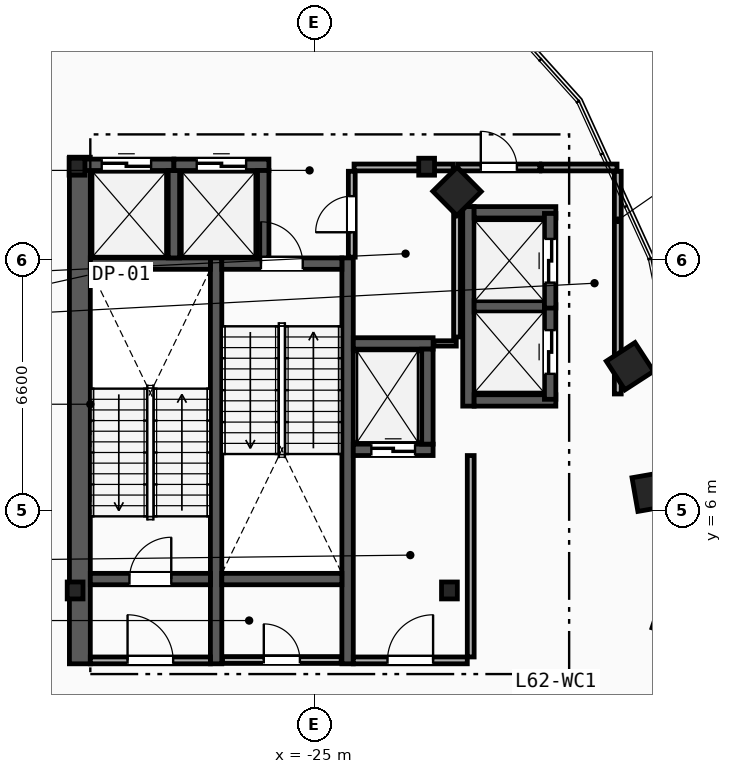
"""IFC4 building model, lengths in metres.
Left out: names, types, materials, properties, quantities, classifications, styles, units other than length and angle.
Written with IfcOpenShell. Run it as: python <this file> out.ifc"""

import sys

from ifc_helpers import new_model, si_unit, direction, frame, frame_2d, origin, origin_2d, place, context, subcontext, project, spatial, rectangle, i_section, extrude, element, fill, save


model = new_model("IFC4")
c1 = context("Model", 3, precision=1e-05, world=origin(), true_north=direction((0.0, 1.0)))
c2 = subcontext(c1, "Body", "Model", "MODEL_VIEW")
j1 = project(units=[si_unit("LENGTHUNIT", "METRE"), si_unit("PLANEANGLEUNIT", "RADIAN")], contexts=[c1])
p1 = place(None, origin())
s1 = spatial("IfcSite", under=j1, at=p1, CompositionType="ELEMENT")
p2 = place(p1, origin())
s2 = spatial("IfcBuilding", under=s1, at=p2, CompositionType="ELEMENT")
p3 = place(p2, frame((0.0, 0.0, 235.0)))
s3 = spatial("IfcBuildingStorey", under=s2, at=p3, CompositionType="ELEMENT", Elevation=235.0)
for number, where, z_axis, x_axis in (
    (1, (-31.3, 3.9, 0.0), (0.0, 0.0, 1.0), (1.0, 0.0, 0.0)),
    (2, (-21.45, 3.9, 0.0), (0.0, 0.0, 1.0), (1.0, 0.0, 0.0)),
    (3, (-22.05, 15.05, 0.0), (0.0, 0.0, 1.0), (1.0, 0.0, 0.0)),
    (4, (-31.25, 15.05, 0.0), (0.0, 0.0, 1.0), (1.0, 0.0, 0.0)),
):
    element("IfcColumn", number, at=place(p3, frame(where, z_axis=z_axis, x_axis=x_axis)), inside=s3, PredefinedType="COLUMN", context=c2, shape_type="SweptSolid", body=[
        extrude(i_section(OverallWidth=0.416, OverallDepth=0.446, WebThickness=0.039, FlangeThickness=0.063, FilletRadius=0.018, at=origin_2d()), origin(), (0.0, 0.0, 1.0), 4.6),
    ])
for number, where, z_axis, x_axis in (
    (5, (-15.55, 3.2, 0.0), (0.0, 0.0, 1.0), (0.315, 0.949, 0.0)),
    (6, (-16.125, 6.5, 0.0), (0.0, 0.0, 1.0), (-0.172, 0.985, 0.0)),
    (7, (-16.7, 9.8, 0.0), (0.0, 0.0, 1.0), (-0.544, 0.839, 0.0)),
    (8, (-21.25, 14.4, 0.0), (0.0, 0.0, 1.0), (-0.703, 0.711, 0.0)),
):
    element("IfcColumn", number, at=place(p3, frame(where, z_axis=z_axis, x_axis=x_axis)), inside=s3, PredefinedType="COLUMN", context=c2, shape_type="SweptSolid", body=[
        extrude(rectangle(XDim=0.9, YDim=0.9, at=origin_2d()), origin(), (0.0, 0.0, 1.0), 4.6),
    ])
p4 = place(p3, frame((-31.175, 1.97, 0.0), z_axis=(0.0, 0.0, 1.0), x_axis=(0.0, 1.0, 0.0)))
e9 = element("IfcWall", 9, at=p4, inside=s3, PredefinedType="SHEAR", context=c2, shape_type="SweptSolid", body=[
    extrude(rectangle(XDim=13.33, YDim=0.55, at=frame_2d((6.665, 0.0))), origin(), (0.0, 0.0, 1.0), 4.34),
])
for number, where, z_axis, x_axis in (
    (10, (-27.59, 1.97, 0.0), (0.0, 0.0, 1.0), (0.0, 1.0, 0.0)),
    (11, (-24.13, 1.97, 0.0), (0.0, 0.0, 1.0), (0.0, 1.0, 0.0)),
):
    element("IfcWall", number, at=place(p3, frame(where, z_axis=z_axis, x_axis=x_axis)), inside=s3, PredefinedType="SHEAR", context=c2, shape_type="SweptSolid", body=[
        extrude(rectangle(XDim=10.68, YDim=0.3, at=frame_2d((5.34, 0.0))), origin(), (0.0, 0.0, 1.0), 4.34),
    ])
p5 = place(p3, frame((-30.9, 4.2, 0.0), z_axis=(0.0, 0.0, 1.0), x_axis=(1.0, 0.0, 0.0)))
e12 = element("IfcWall", 12, at=p5, inside=s3, PredefinedType="SHEAR", context=c2, shape_type="SweptSolid", body=[
    extrude(rectangle(XDim=3.16, YDim=0.3, at=frame_2d((1.58, 0.0))), origin(), (0.0, 0.0, 1.0), 4.34),
])
p6 = place(p5, frame((1.03, 0.0, 0.0)))
e13 = element("IfcOpeningElement", 13, at=p6, cuts=e12, PredefinedType="OPENING", context=c2, shape_type="SweptSolid", body=[
    extrude(rectangle(XDim=1.1, YDim=2.15, at=frame_2d((0.55, 1.075))), frame((0.0, 0.16, 0.0), z_axis=(0.0, -1.0, 0.0), x_axis=(1.0, 0.0, 0.0)), (0.0, 0.0, 1.0), 0.32),
])
p7 = place(p3, frame((-30.9, 12.5, 0.0), z_axis=(0.0, 0.0, 1.0), x_axis=(1.0, 0.0, 0.0)))
e14 = element("IfcWall", 14, at=p7, inside=s3, PredefinedType="SHEAR", context=c2, shape_type="SweptSolid", body=[
    extrude(rectangle(XDim=3.16, YDim=0.3, at=frame_2d((1.58, 0.0))), origin(), (0.0, 0.0, 1.0), 4.34),
])
p8 = place(p3, frame((-27.44, 12.5, 0.0), z_axis=(0.0, 0.0, 1.0), x_axis=(1.0, 0.0, 0.0)))
e15 = element("IfcWall", 15, at=p8, inside=s3, PredefinedType="SHEAR", context=c2, shape_type="SweptSolid", body=[
    extrude(rectangle(XDim=3.16, YDim=0.3, at=frame_2d((1.58, 0.0))), origin(), (0.0, 0.0, 1.0), 4.34),
])
p9 = place(p8, frame((1.03, 0.0, 0.0)))
e16 = element("IfcOpeningElement", 16, at=p9, cuts=e15, PredefinedType="OPENING", context=c2, shape_type="SweptSolid", body=[
    extrude(rectangle(XDim=1.1, YDim=2.15, at=frame_2d((0.55, 1.075))), frame((0.0, 0.16, 0.0), z_axis=(0.0, -1.0, 0.0), x_axis=(1.0, 0.0, 0.0)), (0.0, 0.0, 1.0), 0.32),
])
p10 = place(p3, frame((-27.44, 4.2, 0.0), z_axis=(0.0, 0.0, 1.0), x_axis=(1.0, 0.0, 0.0)))
e17 = element("IfcWall", 17, at=p10, inside=s3, PredefinedType="SHEAR", context=c2, shape_type="SweptSolid", body=[
    extrude(rectangle(XDim=3.16, YDim=0.3, at=frame_2d((1.58, 0.0))), origin(), (0.0, 0.0, 1.0), 4.34),
])
p11 = place(p3, frame((-20.89, 2.15, 0.0), z_axis=(0.0, 0.0, 1.0), x_axis=(0.0, 1.0, 0.0)))
e18 = element("IfcWall", 18, at=p11, inside=s3, PredefinedType="PARTITIONING", context=c2, shape_type="SweptSolid", body=[
    extrude(rectangle(XDim=5.3, YDim=0.18, at=frame_2d((2.65, 0.0))), origin(), (0.0, 0.0, 1.0), 4.34),
])
p12 = place(p3, frame((-23.98, 2.06, 0.0), z_axis=(0.0, 0.0, 1.0), x_axis=(1.0, 0.0, 0.0)))
e19 = element("IfcWall", 19, at=p12, inside=s3, PredefinedType="PARTITIONING", context=c2, shape_type="SweptSolid", body=[
    extrude(rectangle(XDim=3.0, YDim=0.18, at=frame_2d((1.5, 0.0))), origin(), (0.0, 0.0, 1.0), 4.34),
])
p13 = place(p12, frame((0.9, 0.0, 0.0)))
e20 = element("IfcOpeningElement", 20, at=p13, cuts=e19, PredefinedType="OPENING", context=c2, shape_type="SweptSolid", body=[
    extrude(rectangle(XDim=1.2, YDim=2.15, at=frame_2d((0.6, 1.075))), frame((0.0, 0.1, 0.0), z_axis=(0.0, -1.0, 0.0), x_axis=(1.0, 0.0, 0.0)), (0.0, 0.0, 1.0), 0.2),
])
p14 = place(p3, frame((-30.9, 2.06, 0.0), z_axis=(0.0, 0.0, 1.0), x_axis=(1.0, 0.0, 0.0)))
e21 = element("IfcWall", 21, at=p14, inside=s3, PredefinedType="PARTITIONING", context=c2, shape_type="SweptSolid", body=[
    extrude(rectangle(XDim=3.16, YDim=0.18, at=frame_2d((1.58, 0.0))), origin(), (0.0, 0.0, 1.0), 4.34),
])
p15 = place(p14, frame((0.98, 0.0, 0.0)))
e22 = element("IfcOpeningElement", 22, at=p15, cuts=e21, PredefinedType="OPENING", context=c2, shape_type="SweptSolid", body=[
    extrude(rectangle(XDim=1.2, YDim=2.15, at=frame_2d((0.6, 1.075))), frame((0.0, 0.1, 0.0), z_axis=(0.0, -1.0, 0.0), x_axis=(1.0, 0.0, 0.0)), (0.0, 0.0, 1.0), 0.2),
])
p16 = place(p3, frame((-23.98, 7.6, 0.0), z_axis=(0.0, 0.0, 1.0), x_axis=(1.0, 0.0, 0.0)))
e23 = element("IfcWall", 23, at=p16, inside=s3, PredefinedType="SHEAR", context=c2, shape_type="SweptSolid", body=[
    extrude(rectangle(XDim=2.1, YDim=0.3, at=frame_2d((1.05, 0.0))), origin(), (0.0, 0.0, 1.0), 4.34),
])
p17 = place(p16, frame((0.475, 0.0, 0.0)))
e24 = element("IfcOpeningElement", 24, at=p17, cuts=e23, PredefinedType="OPENING", context=c2, shape_type="SweptSolid", body=[
    extrude(rectangle(XDim=1.15, YDim=2.2, at=frame_2d((0.575, 1.1))), frame((0.0, 0.16, 0.0), z_axis=(0.0, -1.0, 0.0), x_axis=(1.0, 0.0, 0.0)), (0.0, 0.0, 1.0), 0.32),
])
p18 = place(p3, frame((-23.98, 10.4, 0.0), z_axis=(0.0, 0.0, 1.0), x_axis=(1.0, 0.0, 0.0)))
e25 = element("IfcWall", 25, at=p18, inside=s3, PredefinedType="SHEAR", context=c2, shape_type="SweptSolid", body=[
    extrude(rectangle(XDim=2.1, YDim=0.3, at=frame_2d((1.05, 0.0))), origin(), (0.0, 0.0, 1.0), 4.34),
])
p19 = place(p3, frame((-22.03, 7.75, 0.0), z_axis=(0.0, 0.0, 1.0), x_axis=(0.0, 1.0, 0.0)))
e26 = element("IfcWall", 26, at=p19, inside=s3, PredefinedType="SHEAR", context=c2, shape_type="SweptSolid", body=[
    extrude(rectangle(XDim=2.5, YDim=0.3, at=frame_2d((1.25, 0.0))), origin(), (0.0, 0.0, 1.0), 4.34),
])
p20 = place(p3, frame((-31.2, 15.1, 0.0), z_axis=(0.0, 0.0, 1.0), x_axis=(1.0, 0.0, 0.0)))
e27 = element("IfcWall", 27, at=p20, inside=s3, PredefinedType="SHEAR", context=c2, shape_type="SweptSolid", body=[
    extrude(rectangle(XDim=2.5, YDim=0.3, at=frame_2d((1.25, 0.0))), origin(), (0.0, 0.0, 1.0), 4.34),
])
p21 = place(p20, frame((0.6, 0.0, 0.0)))
e28 = element("IfcOpeningElement", 28, at=p21, cuts=e27, PredefinedType="OPENING", context=c2, shape_type="SweptSolid", body=[
    extrude(rectangle(XDim=1.3, YDim=2.2, at=frame_2d((0.65, 1.1))), frame((0.0, 0.16, 0.0), z_axis=(0.0, -1.0, 0.0), x_axis=(1.0, 0.0, 0.0)), (0.0, 0.0, 1.0), 0.32),
])
p22 = place(p3, frame((-28.7, 12.65, 0.0), z_axis=(0.0, 0.0, 1.0), x_axis=(0.0, 1.0, 0.0)))
e29 = element("IfcWall", 29, at=p22, inside=s3, PredefinedType="SHEAR", context=c2, shape_type="SweptSolid", body=[
    extrude(rectangle(XDim=2.3, YDim=0.3, at=frame_2d((1.15, 0.0))), origin(), (0.0, 0.0, 1.0), 4.34),
])
p23 = place(p3, frame((-28.7, 15.1, 0.0), z_axis=(0.0, 0.0, 1.0), x_axis=(1.0, 0.0, 0.0)))
e30 = element("IfcWall", 30, at=p23, inside=s3, PredefinedType="SHEAR", context=c2, shape_type="SweptSolid", body=[
    extrude(rectangle(XDim=2.5, YDim=0.3, at=frame_2d((1.25, 0.0))), origin(), (0.0, 0.0, 1.0), 4.34),
])
p24 = place(p23, frame((0.6, 0.0, 0.0)))
e31 = element("IfcOpeningElement", 31, at=p24, cuts=e30, PredefinedType="OPENING", context=c2, shape_type="SweptSolid", body=[
    extrude(rectangle(XDim=1.3, YDim=2.2, at=frame_2d((0.65, 1.1))), frame((0.0, 0.16, 0.0), z_axis=(0.0, -1.0, 0.0), x_axis=(1.0, 0.0, 0.0)), (0.0, 0.0, 1.0), 0.32),
])
p25 = place(p3, frame((-26.35, 12.65, 0.0), z_axis=(0.0, 0.0, 1.0), x_axis=(0.0, 1.0, 0.0)))
e32 = element("IfcWall", 32, at=p25, inside=s3, PredefinedType="SHEAR", context=c2, shape_type="SweptSolid", body=[
    extrude(rectangle(XDim=2.3, YDim=0.3, at=frame_2d((1.15, 0.0))), origin(), (0.0, 0.0, 1.0), 4.34),
])
p26 = place(p3, frame((-20.95, 8.75, 0.0), z_axis=(0.0, 0.0, 1.0), x_axis=(0.0, 1.0, 0.0)))
e33 = element("IfcWall", 33, at=p26, inside=s3, PredefinedType="SHEAR", context=c2, shape_type="SweptSolid", body=[
    extrude(rectangle(XDim=5.25, YDim=0.3, at=frame_2d((2.625, 0.0))), origin(), (0.0, 0.0, 1.0), 4.34),
])
for number, where, z_axis, x_axis in (
    (34, (-20.8, 8.9, 0.0), (0.0, 0.0, 1.0), (1.0, 0.0, 0.0)),
    (35, (-20.8, 13.85, 0.0), (0.0, 0.0, 1.0), (1.0, 0.0, 0.0)),
):
    element("IfcWall", number, at=place(p3, frame(where, z_axis=z_axis, x_axis=x_axis)), inside=s3, PredefinedType="SHEAR", context=c2, shape_type="SweptSolid", body=[
        extrude(rectangle(XDim=2.15, YDim=0.3, at=frame_2d((1.075, 0.0))), origin(), (0.0, 0.0, 1.0), 4.34),
    ])
p27 = place(p3, frame((-20.8, 11.375, 0.0), z_axis=(0.0, 0.0, 1.0), x_axis=(1.0, 0.0, 0.0)))
e36 = element("IfcWall", 36, at=p27, inside=s3, PredefinedType="SHEAR", context=c2, shape_type="SweptSolid", body=[
    extrude(rectangle(XDim=1.85, YDim=0.3, at=frame_2d((0.925, 0.0))), origin(), (0.0, 0.0, 1.0), 4.34),
])
p28 = place(p3, frame((-18.8, 8.93, 0.0), z_axis=(0.0, 0.0, 1.0), x_axis=(0.0, 1.0, 0.0)))
e37 = element("IfcWall", 37, at=p28, inside=s3, PredefinedType="SHEAR", context=c2, shape_type="SweptSolid", body=[
    extrude(rectangle(XDim=2.49, YDim=0.3, at=frame_2d((1.245, 0.0))), origin(), (0.0, 0.0, 1.0), 4.34),
])
p29 = place(p28, frame((0.67, 0.0, 0.0)))
e38 = element("IfcOpeningElement", 38, at=p29, cuts=e37, PredefinedType="OPENING", context=c2, shape_type="SweptSolid", body=[
    extrude(rectangle(XDim=1.15, YDim=2.2, at=frame_2d((0.575, 1.1))), frame((0.0, 0.16, 0.0), z_axis=(0.0, -1.0, 0.0), x_axis=(1.0, 0.0, 0.0)), (0.0, 0.0, 1.0), 0.32),
])
p30 = place(p3, frame((-18.8, 11.33, 0.0), z_axis=(0.0, 0.0, 1.0), x_axis=(0.0, 1.0, 0.0)))
e39 = element("IfcWall", 39, at=p30, inside=s3, PredefinedType="SHEAR", context=c2, shape_type="SweptSolid", body=[
    extrude(rectangle(XDim=2.49, YDim=0.3, at=frame_2d((1.245, 0.0))), origin(), (0.0, 0.0, 1.0), 4.34),
])
p31 = place(p30, frame((0.67, 0.0, 0.0)))
e40 = element("IfcOpeningElement", 40, at=p31, cuts=e39, PredefinedType="OPENING", context=c2, shape_type="SweptSolid", body=[
    extrude(rectangle(XDim=1.15, YDim=2.2, at=frame_2d((0.575, 1.1))), frame((0.0, 0.16, 0.0), z_axis=(0.0, -1.0, 0.0), x_axis=(1.0, 0.0, 0.0)), (0.0, 0.0, 1.0), 0.32),
])
p32 = place(p3, frame((-17.02, 9.07, 0.0), z_axis=(0.0, 0.0, 1.0), x_axis=(0.0, 1.0, 0.0)))
e41 = element("IfcWall", 41, at=p32, inside=s3, PredefinedType="PARTITIONING", context=c2, shape_type="SweptSolid", body=[
    extrude(rectangle(XDim=5.86, YDim=0.18, at=frame_2d((2.93, 0.0))), origin(), (0.0, 0.0, 1.0), 4.34),
])
p33 = place(p3, frame((-21.23, 15.03, 0.0), z_axis=(0.0, 0.0, 1.0), x_axis=(1.0, 0.0, 0.0)))
e42 = element("IfcWall", 42, at=p33, inside=s3, PredefinedType="PARTITIONING", context=c2, shape_type="SweptSolid", body=[
    extrude(rectangle(XDim=2.16, YDim=0.18, at=frame_2d((1.08, 0.0))), origin(), (0.0, 0.0, 1.0), 4.34),
])
p34 = place(p33, frame((0.605, 0.0, 0.0)))
e43 = element("IfcOpeningElement", 43, at=p34, cuts=e42, PredefinedType="OPENING", context=c2, shape_type="SweptSolid", body=[
    extrude(rectangle(XDim=0.95, YDim=2.1, at=frame_2d((0.475, 1.05))), frame((0.0, 0.1, 0.0), z_axis=(0.0, -1.0, 0.0), x_axis=(1.0, 0.0, 0.0)), (0.0, 0.0, 1.0), 0.2),
])
p35 = place(p3, frame((-19.03, 15.03, 0.0), z_axis=(0.0, 0.0, 1.0), x_axis=(1.0, 0.0, 0.0)))
e44 = element("IfcWall", 44, at=p35, inside=s3, PredefinedType="PARTITIONING", context=c2, shape_type="SweptSolid", body=[
    extrude(rectangle(XDim=1.99, YDim=0.18, at=frame_2d((0.995, 0.0))), origin(), (0.0, 0.0, 1.0), 4.34),
])
p36 = place(p3, frame((-21.86, 10.4, 0.0), z_axis=(0.0, 0.0, 1.0), x_axis=(1.0, 0.0, 0.0)))
e45 = element("IfcWall", 45, at=p36, inside=s3, PredefinedType="PARTITIONING", context=c2, shape_type="SweptSolid", body=[
    extrude(rectangle(XDim=0.59, YDim=0.14, at=frame_2d((0.295, 0.0))), origin(), (0.0, 0.0, 1.0), 4.34),
])
p37 = place(p3, frame((-21.25, 10.57, 0.0), z_axis=(0.0, 0.0, 1.0), x_axis=(0.0, 1.0, 0.0)))
e46 = element("IfcWall", 46, at=p37, inside=s3, PredefinedType="PARTITIONING", context=c2, shape_type="SweptSolid", body=[
    extrude(rectangle(XDim=4.36, YDim=0.18, at=frame_2d((2.18, 0.0))), origin(), (0.0, 0.0, 1.0), 4.34),
])
p38 = place(p3, frame((-23.96, 15.03, 0.0), z_axis=(0.0, 0.0, 1.0), x_axis=(1.0, 0.0, 0.0)))
e47 = element("IfcWall", 47, at=p38, inside=s3, PredefinedType="PARTITIONING", context=c2, shape_type="SweptSolid", body=[
    extrude(rectangle(XDim=2.61, YDim=0.18, at=frame_2d((1.305, 0.0))), origin(), (0.0, 0.0, 1.0), 3.413),
])
p39 = place(p3, frame((-27.42, 2.07, 0.0), z_axis=(0.0, 0.0, 1.0), x_axis=(1.0, 0.0, 0.0)))
e48 = element("IfcWall", 48, at=p39, inside=s3, PredefinedType="PARTITIONING", context=c2, shape_type="SweptSolid", body=[
    extrude(rectangle(XDim=3.12, YDim=0.18, at=frame_2d((1.56, 0.0))), origin(), (0.0, 0.0, 1.0), 4.34),
])
p40 = place(p39, frame((1.085, 0.0, 0.0)))
e49 = element("IfcOpeningElement", 49, at=p40, cuts=e48, PredefinedType="OPENING", context=c2, shape_type="SweptSolid", body=[
    extrude(rectangle(XDim=0.95, YDim=2.1, at=frame_2d((0.475, 1.05))), frame((0.0, 0.1, 0.0), z_axis=(0.0, -1.0, 0.0), x_axis=(1.0, 0.0, 0.0)), (0.0, 0.0, 1.0), 0.2),
])
p41 = place(p3, frame((-24.02, 12.67, 0.0), z_axis=(0.0, 0.0, 1.0), x_axis=(0.0, 1.0, 0.0)))
e50 = element("IfcWall", 50, at=p41, inside=s3, PredefinedType="PARTITIONING", context=c2, shape_type="SweptSolid", body=[
    extrude(rectangle(XDim=2.26, YDim=0.18, at=frame_2d((1.13, 0.0))), origin(), (0.0, 0.0, 1.0), 4.34),
])
p42 = place(p41, frame((0.655, 0.0, 0.0)))
e51 = element("IfcOpeningElement", 51, at=p42, cuts=e50, PredefinedType="OPENING", context=c2, shape_type="SweptSolid", body=[
    extrude(rectangle(XDim=0.95, YDim=2.1, at=frame_2d((0.475, 1.05))), frame((0.0, 0.1, 0.0), z_axis=(0.0, -1.0, 0.0), x_axis=(1.0, 0.0, 0.0)), (0.0, 0.0, 1.0), 0.2),
])
p43 = place(p6, origin())
e52 = element("IfcDoor", 52, at=p43, inside=s3, OperationType="SINGLE_SWING_RIGHT", PredefinedType="DOOR", context=c2, shape_type="SweptSolid", body=[
    extrude(rectangle(XDim=1.1, YDim=2.15, at=frame_2d((0.55, 1.075))), frame((0.0, 0.025, 0.0), z_axis=(0.0, -1.0, 0.0), x_axis=(1.0, 0.0, 0.0)), (0.0, 0.0, 1.0), 0.05),
])
fill(e13, e52)
p44 = place(p9, origin())
e53 = element("IfcDoor", 53, at=p44, inside=s3, OperationType="SINGLE_SWING_LEFT", PredefinedType="DOOR", context=c2, shape_type="SweptSolid", body=[
    extrude(rectangle(XDim=1.1, YDim=2.15, at=frame_2d((0.55, 1.075))), frame((0.0, 0.025, 0.0), z_axis=(0.0, -1.0, 0.0), x_axis=(1.0, 0.0, 0.0)), (0.0, 0.0, 1.0), 0.05),
])
fill(e16, e53)
p45 = place(p13, origin())
e54 = element("IfcDoor", 54, at=p45, inside=s3, OperationType="SINGLE_SWING_RIGHT", PredefinedType="DOOR", context=c2, shape_type="SweptSolid", body=[
    extrude(rectangle(XDim=1.2, YDim=2.15, at=frame_2d((0.6, 1.075))), frame((0.0, 0.025, 0.0), z_axis=(0.0, -1.0, 0.0), x_axis=(1.0, 0.0, 0.0)), (0.0, 0.0, 1.0), 0.05),
])
fill(e20, e54)
p46 = place(p15, origin())
e55 = element("IfcDoor", 55, at=p46, inside=s3, OperationType="SINGLE_SWING_LEFT", PredefinedType="DOOR", context=c2, shape_type="SweptSolid", body=[
    extrude(rectangle(XDim=1.2, YDim=2.15, at=frame_2d((0.6, 1.075))), frame((0.0, 0.025, 0.0), z_axis=(0.0, -1.0, 0.0), x_axis=(1.0, 0.0, 0.0)), (0.0, 0.0, 1.0), 0.05),
])
fill(e22, e55)
p47 = place(p17, origin())
e56 = element("IfcDoor", 56, at=p47, inside=s3, OperationType="SLIDING_TO_LEFT", PredefinedType="TRAPDOOR", context=c2, shape_type="SweptSolid", body=[
    extrude(rectangle(XDim=1.15, YDim=2.2, at=frame_2d((0.575, 1.1))), frame((0.0, 0.025, 0.0), z_axis=(0.0, -1.0, 0.0), x_axis=(1.0, 0.0, 0.0)), (0.0, 0.0, 1.0), 0.05),
])
fill(e24, e56)
p48 = place(p21, origin())
e57 = element("IfcDoor", 57, at=p48, inside=s3, OperationType="SLIDING_TO_LEFT", PredefinedType="TRAPDOOR", context=c2, shape_type="SweptSolid", body=[
    extrude(rectangle(XDim=1.3, YDim=2.2, at=frame_2d((0.65, 1.1))), frame((0.0, 0.025, 0.0), z_axis=(0.0, -1.0, 0.0), x_axis=(1.0, 0.0, 0.0)), (0.0, 0.0, 1.0), 0.05),
])
fill(e28, e57)
p49 = place(p24, origin())
e58 = element("IfcDoor", 58, at=p49, inside=s3, OperationType="SLIDING_TO_LEFT", PredefinedType="TRAPDOOR", context=c2, shape_type="SweptSolid", body=[
    extrude(rectangle(XDim=1.3, YDim=2.2, at=frame_2d((0.65, 1.1))), frame((0.0, 0.025, 0.0), z_axis=(0.0, -1.0, 0.0), x_axis=(1.0, 0.0, 0.0)), (0.0, 0.0, 1.0), 0.05),
])
fill(e31, e58)
p50 = place(p29, origin())
e59 = element("IfcDoor", 59, at=p50, inside=s3, OperationType="SLIDING_TO_LEFT", PredefinedType="TRAPDOOR", context=c2, shape_type="SweptSolid", body=[
    extrude(rectangle(XDim=1.15, YDim=2.2, at=frame_2d((0.575, 1.1))), frame((0.0, 0.025, 0.0), z_axis=(0.0, -1.0, 0.0), x_axis=(1.0, 0.0, 0.0)), (0.0, 0.0, 1.0), 0.05),
])
fill(e38, e59)
p51 = place(p31, origin())
e60 = element("IfcDoor", 60, at=p51, inside=s3, OperationType="SLIDING_TO_LEFT", PredefinedType="TRAPDOOR", context=c2, shape_type="SweptSolid", body=[
    extrude(rectangle(XDim=1.15, YDim=2.2, at=frame_2d((0.575, 1.1))), frame((0.0, 0.025, 0.0), z_axis=(0.0, -1.0, 0.0), x_axis=(1.0, 0.0, 0.0)), (0.0, 0.0, 1.0), 0.05),
])
fill(e40, e60)
p52 = place(p40, origin())
e61 = element("IfcDoor", 61, at=p52, inside=s3, OperationType="SINGLE_SWING_LEFT", PredefinedType="DOOR", context=c2, shape_type="SweptSolid", body=[
    extrude(rectangle(XDim=0.95, YDim=2.1, at=frame_2d((0.475, 1.05))), frame((0.0, 0.025, 0.0), z_axis=(0.0, -1.0, 0.0), x_axis=(1.0, 0.0, 0.0)), (0.0, 0.0, 1.0), 0.05),
])
fill(e49, e61)
p53 = place(p42, origin())
e62 = element("IfcDoor", 62, at=p53, inside=s3, OperationType="SINGLE_SWING_LEFT", PredefinedType="DOOR", context=c2, shape_type="SweptSolid", body=[
    extrude(rectangle(XDim=0.95, YDim=2.1, at=frame_2d((0.475, 1.05))), frame((0.0, 0.025, 0.0), z_axis=(0.0, -1.0, 0.0), x_axis=(1.0, 0.0, 0.0)), (0.0, 0.0, 1.0), 0.05),
])
fill(e51, e62)
p54 = place(p34, origin())
e63 = element("IfcDoor", 63, at=p54, inside=s3, OperationType="SINGLE_SWING_LEFT", PredefinedType="DOOR", context=c2, shape_type="SweptSolid", body=[
    extrude(rectangle(XDim=0.95, YDim=2.1, at=frame_2d((0.475, 1.05))), frame((0.0, 0.025, 0.0), z_axis=(0.0, -1.0, 0.0), x_axis=(1.0, 0.0, 0.0)), (0.0, 0.0, 1.0), 0.05),
])
fill(e43, e63)
save(model, sys.argv[1])
